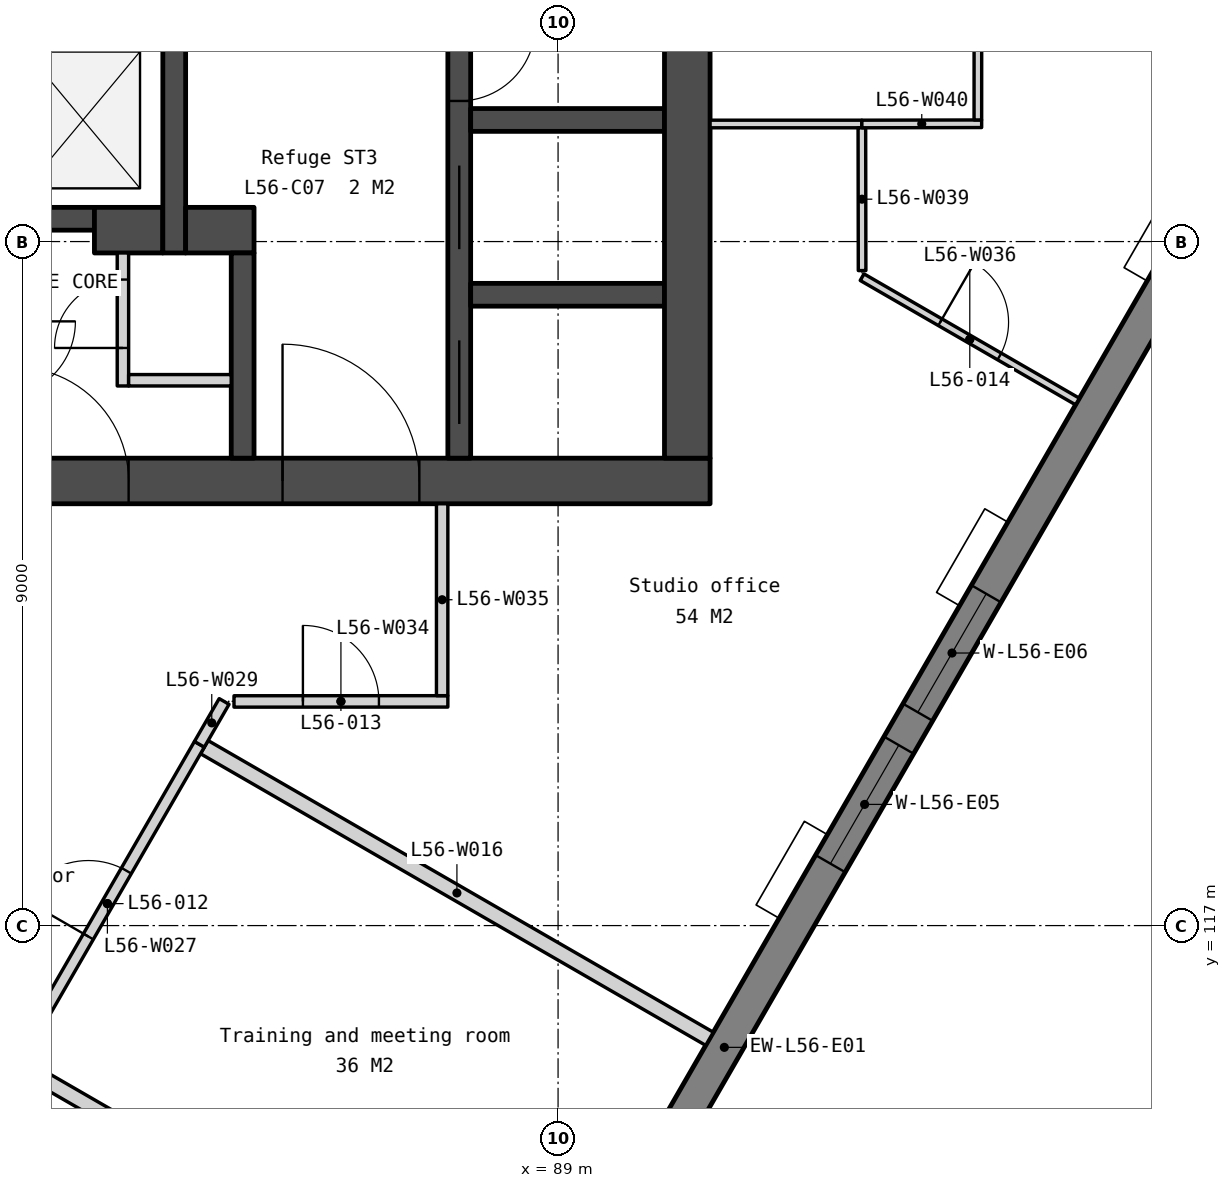
"""IFC4 building model, lengths in metres.
Left out: names, types, materials, properties, quantities, classifications, styles, units other than length and angle.
Written with IfcOpenShell. Run it as: python <this file> out.ifc"""

import sys

from ifc_helpers import new_model, si_unit, direction, frame, frame_2d, origin, place, context, subcontext, project, spatial, polyline, rectangle, outline, extrude, element, fill, save


model = new_model("IFC4")
c1 = context("Model", 3, precision=1e-05, world=origin(), true_north=direction((0.0, 1.0)))
c2 = subcontext(c1, "Body", "Model", "MODEL_VIEW")
j1 = project(units=[si_unit("LENGTHUNIT", "METRE"), si_unit("PLANEANGLEUNIT", "RADIAN")], contexts=[c1])
p1 = place(None, origin())
s1 = spatial("IfcSite", under=j1, at=p1, CompositionType="ELEMENT")
p2 = place(p1, origin())
s2 = spatial("IfcBuilding", under=s1, at=p2, CompositionType="ELEMENT")
p3 = place(p2, frame((0.0, 0.0, 223.1)))
s3 = spatial("IfcBuildingStorey", under=s2, at=p3, CompositionType="ELEMENT", Elevation=223.1)
p4 = place(p3, frame((69.0, 122.85, 0.0), z_axis=(0.0, 0.0, 1.0), x_axis=(1.0, 0.0, 0.0)))
e1 = element("IfcWall", 1, at=p4, inside=s3, PredefinedType="SOLIDWALL", context=c2, shape_type="SweptSolid", body=[
    extrude(rectangle(XDim=22.0, YDim=0.6, at=frame_2d((11.0, 0.0))), origin(), (0.0, 0.0, 1.0), 3.6),
])
p5 = place(p4, frame((16.375, 0.0, 0.0)))
e2 = element("IfcOpeningElement", 2, at=p5, cuts=e1, PredefinedType="OPENING", context=c2, shape_type="SweptSolid", body=[
    extrude(rectangle(XDim=1.8, YDim=2.1, at=frame_2d((0.9, 1.05))), frame((0.0, 0.31, 0.0), z_axis=(0.0, -1.0, 0.0), x_axis=(1.0, 0.0, 0.0)), (0.0, 0.0, 1.0), 0.62),
])
p6 = place(p4, frame((3.825, 0.0, 0.0)))
e3 = element("IfcOpeningElement", 3, at=p6, cuts=e1, PredefinedType="OPENING", context=c2, shape_type="SweptSolid", body=[
    extrude(rectangle(XDim=1.8, YDim=2.1, at=frame_2d((0.9, 1.05))), frame((0.0, 0.31, 0.0), z_axis=(0.0, -1.0, 0.0), x_axis=(1.0, 0.0, 0.0)), (0.0, 0.0, 1.0), 0.62),
])
p7 = place(p4, frame((12.85, 0.0, 0.0)))
e4 = element("IfcOpeningElement", 4, at=p7, cuts=e1, PredefinedType="OPENING", context=c2, shape_type="SweptSolid", body=[
    extrude(rectangle(XDim=1.5, YDim=2.1, at=frame_2d((0.75, 1.05))), frame((0.0, 0.31, 0.0), z_axis=(0.0, -1.0, 0.0), x_axis=(1.0, 0.0, 0.0)), (0.0, 0.0, 1.0), 0.62),
])
p8 = place(p3, frame((81.7, 126.3, 0.0), z_axis=(0.0, 0.0, 1.0), x_axis=(1.0, 0.0, 0.0)))
e5 = element("IfcWall", 5, at=p8, inside=s3, PredefinedType="SOLIDWALL", context=c2, shape_type="SweptSolid", body=[
    extrude(rectangle(XDim=1.2, YDim=0.3, at=frame_2d((0.6, 0.0))), origin(), (0.0, 0.0, 1.0), 3.6),
])
p9 = place(p3, frame((82.9, 126.15, 0.0), z_axis=(0.0, 0.0, 1.0), x_axis=(1.0, 0.0, 0.0)))
e6 = element("IfcWall", 6, at=p9, inside=s3, PredefinedType="SOLIDWALL", context=c2, shape_type="SweptSolid", body=[
    extrude(rectangle(XDim=0.9, YDim=0.6, at=frame_2d((0.45, 0.0))), origin(), (0.0, 0.0, 1.0), 3.6),
])
p10 = place(p3, frame((83.275, 125.85, 0.0), z_axis=(0.0, 0.0, 1.0), x_axis=(0.0, -1.0, 0.0)))
e7 = element("IfcWall", 7, at=p10, inside=s3, PredefinedType="PARTITIONING", context=c2, shape_type="SweptSolid", body=[
    extrude(rectangle(XDim=1.75, YDim=0.15, at=frame_2d((0.875, 0.0))), origin(), (0.0, 0.0, 1.0), 3.6),
])
p11 = place(p10, frame((0.35, 0.0, 0.0)))
e8 = element("IfcOpeningElement", 8, at=p11, cuts=e7, PredefinedType="OPENING", context=c2, shape_type="SweptSolid", body=[
    extrude(rectangle(XDim=0.9, YDim=2.1, at=frame_2d((0.45, 1.05))), frame((0.0, 0.085, 0.0), z_axis=(0.0, -1.0, 0.0), x_axis=(1.0, 0.0, 0.0)), (0.0, 0.0, 1.0), 0.17),
])
p12 = place(p3, frame((83.35, 124.175, 0.0), z_axis=(0.0, 0.0, 1.0), x_axis=(1.0, 0.0, 0.0)))
e9 = element("IfcWall", 9, at=p12, inside=s3, PredefinedType="PARTITIONING", context=c2, shape_type="SweptSolid", body=[
    extrude(rectangle(XDim=1.35, YDim=0.15, at=frame_2d((0.675, 0.0))), origin(), (0.0, 0.0, 1.0), 3.6),
])
p13 = place(p3, frame((83.95, 133.95, 0.0), z_axis=(0.0, 0.0, 1.0), x_axis=(0.0, -1.0, 0.0)))
e10 = element("IfcWall", 10, at=p13, inside=s3, PredefinedType="SOLIDWALL", context=c2, shape_type="SweptSolid", body=[
    extrude(rectangle(XDim=8.1, YDim=0.3, at=frame_2d((4.05, 0.0))), origin(), (0.0, 0.0, 1.0), 3.6),
])
p14 = place(p3, frame((84.1, 126.15, 0.0), z_axis=(0.0, 0.0, 1.0), x_axis=(1.0, 0.0, 0.0)))
e11 = element("IfcWall", 11, at=p14, inside=s3, PredefinedType="SOLIDWALL", context=c2, shape_type="SweptSolid", body=[
    extrude(rectangle(XDim=0.9, YDim=0.6, at=frame_2d((0.45, 0.0))), origin(), (0.0, 0.0, 1.0), 3.6),
])
p15 = place(p3, frame((84.85, 125.85, 0.0), z_axis=(0.0, 0.0, 1.0), x_axis=(0.0, -1.0, 0.0)))
e12 = element("IfcWall", 12, at=p15, inside=s3, PredefinedType="SOLIDWALL", context=c2, shape_type="SweptSolid", body=[
    extrude(rectangle(XDim=2.7, YDim=0.3, at=frame_2d((1.35, 0.0))), origin(), (0.0, 0.0, 1.0), 3.6),
])
p16 = place(p3, frame((87.7, 133.95, 0.0), z_axis=(0.0, 0.0, 1.0), x_axis=(0.0, -1.0, 0.0)))
e13 = element("IfcWall", 13, at=p16, inside=s3, PredefinedType="SOLIDWALL", context=c2, shape_type="SweptSolid", body=[
    extrude(rectangle(XDim=10.8, YDim=0.3, at=frame_2d((5.4, 0.0))), origin(), (0.0, 0.0, 1.0), 3.6),
])
p17 = place(p16, frame((6.95, 0.0, 0.0)))
e14 = element("IfcOpeningElement", 14, at=p17, cuts=e13, PredefinedType="OPENING", context=c2, shape_type="SweptSolid", body=[
    extrude(rectangle(XDim=1.1, YDim=2.1, at=frame_2d((0.55, 1.05))), frame((0.0, 0.16, 0.0), z_axis=(0.0, -1.0, 0.0), x_axis=(1.0, 0.0, 0.0)), (0.0, 0.0, 1.0), 0.32),
])
p18 = place(p16, frame((5.1, 0.0, 0.0)))
e15 = element("IfcOpeningElement", 15, at=p18, cuts=e13, PredefinedType="OPENING", context=c2, shape_type="SweptSolid", body=[
    extrude(rectangle(XDim=1.0, YDim=2.1, at=frame_2d((0.5, 1.05))), frame((0.0, 0.16, 0.0), z_axis=(0.0, -1.0, 0.0), x_axis=(1.0, 0.0, 0.0)), (0.0, 0.0, 1.0), 0.32),
])
p19 = place(p16, frame((9.25, 0.0, 0.0)))
e16 = element("IfcOpeningElement", 16, at=p19, cuts=e13, PredefinedType="OPENING", context=c2, shape_type="SweptSolid", body=[
    extrude(rectangle(XDim=1.1, YDim=2.1, at=frame_2d((0.55, 1.05))), frame((0.0, 0.16, 0.0), z_axis=(0.0, -1.0, 0.0), x_axis=(1.0, 0.0, 0.0)), (0.0, 0.0, 1.0), 0.32),
])
for number, where, z_axis, x_axis in (
    (17, (87.85, 127.6, 0.0), (0.0, 0.0, 1.0), (1.0, 0.0, 0.0)),
    (18, (87.85, 125.3, 0.0), (0.0, 0.0, 1.0), (1.0, 0.0, 0.0)),
):
    element("IfcWall", number, at=place(p3, frame(where, z_axis=z_axis, x_axis=x_axis)), inside=s3, PredefinedType="SOLIDWALL", context=c2, shape_type="SweptSolid", body=[
        extrude(rectangle(XDim=2.55, YDim=0.3, at=frame_2d((1.275, 0.0))), origin(), (0.0, 0.0, 1.0), 3.6),
    ])
p20 = place(p3, frame((90.7, 133.95, 0.0), z_axis=(0.0, 0.0, 1.0), x_axis=(0.0, -1.0, 0.0)))
e19 = element("IfcWall", 19, at=p20, inside=s3, PredefinedType="SOLIDWALL", context=c2, shape_type="SweptSolid", body=[
    extrude(rectangle(XDim=10.8, YDim=0.6, at=frame_2d((5.4, 0.0))), origin(), (0.0, 0.0, 1.0), 3.6),
])
p21 = place(p3, frame((81.505, 98.627, -0.15), z_axis=(0.0, 0.0, 1.0), x_axis=(0.500002199942, 0.866024133644, 0.0)))
e20 = element("IfcWall", 20, at=p21, inside=s3, PredefinedType="SOLIDWALL", context=c2, shape_type="SweptSolid", body=[
    extrude(outline(polyline([(38.729, 0.0), (38.729, 3.75), (0.0, 3.75), (0.0, 0.0), (38.729, 0.0)])), frame((0.0, 0.225, 0.0), z_axis=(0.0, -1.0, 0.0), x_axis=(1.0, 0.0, 0.0)), (0.0, 0.0, 1.0), 0.45),
])
p22 = place(p21, frame((2.791, 0.0, 0.95)))
e21 = element("IfcOpeningElement", 21, at=p22, cuts=e20, PredefinedType="OPENING", context=c2, shape_type="SweptSolid", body=[
    extrude(rectangle(XDim=1.8, YDim=2.2, at=frame_2d((0.9, 1.1))), frame((0.0, 0.235, 0.0), z_axis=(0.0, -1.0, 0.0), x_axis=(1.0, 0.0, 0.0)), (0.0, 0.0, 1.0), 0.47),
])
p23 = place(p21, frame((5.091, 0.0, 0.95)))
e22 = element("IfcOpeningElement", 22, at=p23, cuts=e20, PredefinedType="OPENING", context=c2, shape_type="SweptSolid", body=[
    extrude(rectangle(XDim=1.8, YDim=2.2, at=frame_2d((0.9, 1.1))), frame((0.0, 0.235, 0.0), z_axis=(0.0, -1.0, 0.0), x_axis=(1.0, 0.0, 0.0)), (0.0, 0.0, 1.0), 0.47),
])
p24 = place(p21, frame((12.473, 0.0, 0.95)))
e23 = element("IfcOpeningElement", 23, at=p24, cuts=e20, PredefinedType="OPENING", context=c2, shape_type="SweptSolid", body=[
    extrude(rectangle(XDim=1.8, YDim=2.2, at=frame_2d((0.9, 1.1))), frame((0.0, 0.235, 0.0), z_axis=(0.0, -1.0, 0.0), x_axis=(1.0, 0.0, 0.0)), (0.0, 0.0, 1.0), 0.47),
])
p25 = place(p21, frame((14.773, 0.0, 0.95)))
e24 = element("IfcOpeningElement", 24, at=p25, cuts=e20, PredefinedType="OPENING", context=c2, shape_type="SweptSolid", body=[
    extrude(rectangle(XDim=1.8, YDim=2.2, at=frame_2d((0.9, 1.1))), frame((0.0, 0.235, 0.0), z_axis=(0.0, -1.0, 0.0), x_axis=(1.0, 0.0, 0.0)), (0.0, 0.0, 1.0), 0.47),
])
p26 = place(p21, frame((22.156, 0.0, 0.95)))
e25 = element("IfcOpeningElement", 25, at=p26, cuts=e20, PredefinedType="OPENING", context=c2, shape_type="SweptSolid", body=[
    extrude(rectangle(XDim=1.8, YDim=2.2, at=frame_2d((0.9, 1.1))), frame((0.0, 0.235, 0.0), z_axis=(0.0, -1.0, 0.0), x_axis=(1.0, 0.0, 0.0)), (0.0, 0.0, 1.0), 0.47),
])
p27 = place(p21, frame((24.456, 0.0, 0.95)))
e26 = element("IfcOpeningElement", 26, at=p27, cuts=e20, PredefinedType="OPENING", context=c2, shape_type="SweptSolid", body=[
    extrude(rectangle(XDim=1.8, YDim=2.2, at=frame_2d((0.9, 1.1))), frame((0.0, 0.235, 0.0), z_axis=(0.0, -1.0, 0.0), x_axis=(1.0, 0.0, 0.0)), (0.0, 0.0, 1.0), 0.47),
])
p28 = place(p21, frame((31.838, 0.0, 0.95)))
e27 = element("IfcOpeningElement", 27, at=p28, cuts=e20, PredefinedType="OPENING", context=c2, shape_type="SweptSolid", body=[
    extrude(rectangle(XDim=1.8, YDim=2.2, at=frame_2d((0.9, 1.1))), frame((0.0, 0.235, 0.0), z_axis=(0.0, -1.0, 0.0), x_axis=(1.0, 0.0, 0.0)), (0.0, 0.0, 1.0), 0.47),
])
p29 = place(p21, frame((34.138, 0.0, 0.95)))
e28 = element("IfcOpeningElement", 28, at=p29, cuts=e20, PredefinedType="OPENING", context=c2, shape_type="SweptSolid", body=[
    extrude(rectangle(XDim=1.8, YDim=2.2, at=frame_2d((0.9, 1.1))), frame((0.0, 0.235, 0.0), z_axis=(0.0, -1.0, 0.0), x_axis=(1.0, 0.0, 0.0)), (0.0, 0.0, 1.0), 0.47),
])
p30 = place(p3, frame((81.934, 115.15, 0.0), z_axis=(0.0, 0.0, 1.0), x_axis=(0.866027525232, -0.499996325527, 0.0)))
e29 = element("IfcWall", 29, at=p30, inside=s3, PredefinedType="PARTITIONING", context=c2, shape_type="SweptSolid", body=[
    extrude(rectangle(XDim=7.665, YDim=0.2, at=frame_2d((3.833, 0.0))), origin(), (0.0, 0.0, 1.0), 3.6),
])
p31 = place(p3, frame((84.346, 119.348, 0.0), z_axis=(0.0, 0.0, 1.0), x_axis=(0.866030377306, -0.499991385509, 0.0)))
e30 = element("IfcWall", 30, at=p31, inside=s3, PredefinedType="PARTITIONING", context=c2, shape_type="SweptSolid", body=[
    extrude(rectangle(XDim=7.675, YDim=0.2, at=frame_2d((3.837, 0.0))), origin(), (0.0, 0.0, 1.0), 3.6),
])
p32 = place(p3, frame((81.86, 115.193, 0.0), z_axis=(0.0, 0.0, 1.0), x_axis=(0.500006196252, 0.866021826347, 0.0)))
e31 = element("IfcWall", 31, at=p32, inside=s3, PredefinedType="PARTITIONING", context=c2, shape_type="SweptSolid", body=[
    extrude(rectangle(XDim=4.841, YDim=0.15, at=frame_2d((2.421, 0.0))), origin(), (0.0, 0.0, 1.0), 3.6),
])
p33 = place(p32, frame((1.921, 0.0, 0.0)))
e32 = element("IfcOpeningElement", 32, at=p33, cuts=e31, PredefinedType="OPENING", context=c2, shape_type="SweptSolid", body=[
    extrude(rectangle(XDim=1.0, YDim=2.1, at=frame_2d((0.5, 1.05))), frame((0.0, 0.085, 0.0), z_axis=(0.0, -1.0, 0.0), x_axis=(1.0, 0.0, 0.0)), (0.0, 0.0, 1.0), 0.17),
])
p34 = place(p3, frame((84.281, 119.385, 0.0), z_axis=(0.0, 0.0, 1.0), x_axis=(0.499971370958, 0.866041932139, 0.0)))
e33 = element("IfcWall", 33, at=p34, inside=s3, PredefinedType="PARTITIONING", context=c2, shape_type="SweptSolid", body=[
    extrude(rectangle(XDim=0.651, YDim=0.15, at=frame_2d((0.325, 0.0))), origin(), (0.0, 0.0, 1.0), 3.6),
])
p35 = place(p3, frame((84.736, 119.949, 0.0), z_axis=(0.0, 0.0, 1.0), x_axis=(0.999999939771, 0.000347071563, 0.0)))
e34 = element("IfcWall", 34, at=p35, inside=s3, PredefinedType="PARTITIONING", context=c2, shape_type="SweptSolid", body=[
    extrude(rectangle(XDim=2.814, YDim=0.15, at=frame_2d((1.407, 0.0))), origin(), (0.0, 0.0, 1.0), 3.6),
])
p36 = place(p35, frame((0.907, 0.0, 0.0)))
e35 = element("IfcOpeningElement", 35, at=p36, cuts=e34, PredefinedType="OPENING", context=c2, shape_type="SweptSolid", body=[
    extrude(rectangle(XDim=1.0, YDim=2.1, at=frame_2d((0.5, 1.05))), frame((0.0, 0.085, 0.0), z_axis=(0.0, -1.0, 0.0), x_axis=(1.0, 0.0, 0.0)), (0.0, 0.0, 1.0), 0.17),
])
p37 = place(p3, frame((87.475, 120.025, 0.0), z_axis=(0.0, 0.0, 1.0), x_axis=(9.6683747e-05, 0.999999995326, 0.0)))
e36 = element("IfcWall", 36, at=p37, inside=s3, PredefinedType="PARTITIONING", context=c2, shape_type="SweptSolid", body=[
    extrude(rectangle(XDim=2.525, YDim=0.15, at=frame_2d((1.263, 0.0))), origin(), (0.0, 0.0, 1.0), 3.6),
])
p38 = place(p3, frame((93.0, 125.531, 0.0), z_axis=(0.0, 0.0, 1.0), x_axis=(0.866035243948, -0.499982955949, 0.0)))
e37 = element("IfcWall", 37, at=p38, inside=s3, PredefinedType="PARTITIONING", context=c2, shape_type="SweptSolid", body=[
    extrude(rectangle(XDim=3.272, YDim=0.1, at=frame_2d((1.636, 0.0))), origin(), (0.0, 0.0, 1.0), 3.6),
])
p39 = place(p38, frame((1.186, 0.0, 0.0)))
e38 = element("IfcOpeningElement", 38, at=p39, cuts=e37, PredefinedType="OPENING", context=c2, shape_type="SweptSolid", body=[
    extrude(rectangle(XDim=0.9, YDim=2.1, at=frame_2d((0.45, 1.05))), frame((0.0, 0.06, 0.0), z_axis=(0.0, -1.0, 0.0), x_axis=(1.0, 0.0, 0.0)), (0.0, 0.0, 1.0), 0.12),
])
p40 = place(p3, frame((91.0, 127.547, 0.0), z_axis=(0.0, 0.0, 1.0), x_axis=(1.0, 0.0, 0.0)))
e39 = element("IfcWall", 39, at=p40, inside=s3, PredefinedType="PARTITIONING", context=c2, shape_type="SweptSolid", body=[
    extrude(rectangle(XDim=1.997, YDim=0.1, at=frame_2d((0.999, 0.0))), origin(), (0.0, 0.0, 1.0), 3.6),
])
p41 = place(p3, frame((93.0, 125.618, 0.0), z_axis=(0.0, 0.0, 1.0), x_axis=(-0.001559249664, 0.99999878437, 0.0)))
e40 = element("IfcWall", 40, at=p41, inside=s3, PredefinedType="PARTITIONING", context=c2, shape_type="SweptSolid", body=[
    extrude(rectangle(XDim=1.879, YDim=0.1, at=frame_2d((0.939, 0.0))), origin(), (0.0, 0.0, 1.0), 3.6),
])
p42 = place(p3, frame((92.997, 127.547, 0.0), z_axis=(0.0, 0.0, 1.0), x_axis=(0.999998272019, 0.0018590208, 0.0)))
e41 = element("IfcWall", 41, at=p42, inside=s3, PredefinedType="PARTITIONING", context=c2, shape_type="SweptSolid", body=[
    extrude(rectangle(XDim=1.576, YDim=0.1, at=frame_2d((0.788, 0.0))), origin(), (0.0, 0.0, 1.0), 3.6),
])
p43 = place(p3, frame((94.523, 127.6, 0.0), z_axis=(0.0, 0.0, 1.0), x_axis=(0.00049179746, 0.999999879068, 0.0)))
e42 = element("IfcWall", 42, at=p43, inside=s3, PredefinedType="PARTITIONING", context=c2, shape_type="SweptSolid", body=[
    extrude(rectangle(XDim=6.95, YDim=0.1, at=frame_2d((3.475, 0.0))), origin(), (0.0, 0.0, 1.0), 3.6),
])
p44 = place(p43, frame((2.975, 0.0, 0.0)))
e43 = element("IfcOpeningElement", 43, at=p44, cuts=e42, PredefinedType="OPENING", context=c2, shape_type="SweptSolid", body=[
    extrude(rectangle(XDim=1.0, YDim=2.1, at=frame_2d((0.5, 1.05))), frame((0.0, 0.06, 0.0), z_axis=(0.0, -1.0, 0.0), x_axis=(1.0, 0.0, 0.0)), (0.0, 0.0, 1.0), 0.12),
])
p45 = place(p17, origin())
e44 = element("IfcDoor", 44, at=p45, inside=s3, OperationType="SLIDING_TO_LEFT", PredefinedType="DOOR", context=c2, shape_type="SweptSolid", body=[
    extrude(rectangle(XDim=1.1, YDim=2.1, at=frame_2d((0.55, 1.05))), frame((0.0, 0.025, 0.0), z_axis=(0.0, -1.0, 0.0), x_axis=(1.0, 0.0, 0.0)), (0.0, 0.0, 1.0), 0.05),
])
fill(e14, e44)
p46 = place(p5, origin())
e45 = element("IfcDoor", 45, at=p46, inside=s3, OperationType="DOUBLE_DOOR_DOUBLE_SWING", PredefinedType="DOOR", context=c2, shape_type="SweptSolid", body=[
    extrude(rectangle(XDim=1.8, YDim=2.1, at=frame_2d((0.9, 1.05))), frame((0.0, 0.025, 0.0), z_axis=(0.0, -1.0, 0.0), x_axis=(1.0, 0.0, 0.0)), (0.0, 0.0, 1.0), 0.05),
])
fill(e2, e45)
p47 = place(p7, origin())
e46 = element("IfcDoor", 46, at=p47, inside=s3, OperationType="DOUBLE_DOOR_DOUBLE_SWING", PredefinedType="DOOR", context=c2, shape_type="SweptSolid", body=[
    extrude(rectangle(XDim=1.5, YDim=2.1, at=frame_2d((0.75, 1.05))), frame((0.0, 0.025, 0.0), z_axis=(0.0, -1.0, 0.0), x_axis=(1.0, 0.0, 0.0)), (0.0, 0.0, 1.0), 0.05),
])
fill(e4, e46)
p48 = place(p11, origin())
e47 = element("IfcDoor", 47, at=p48, inside=s3, OperationType="SINGLE_SWING_RIGHT", PredefinedType="DOOR", context=c2, shape_type="SweptSolid", body=[
    extrude(rectangle(XDim=0.9, YDim=2.1, at=frame_2d((0.45, 1.05))), frame((0.0, 0.025, 0.0), z_axis=(0.0, -1.0, 0.0), x_axis=(1.0, 0.0, 0.0)), (0.0, 0.0, 1.0), 0.05),
])
fill(e8, e47)
p49 = place(p18, origin())
e48 = element("IfcDoor", 48, at=p49, inside=s3, OperationType="SINGLE_SWING_LEFT", PredefinedType="DOOR", context=c2, shape_type="SweptSolid", body=[
    extrude(rectangle(XDim=1.0, YDim=2.1, at=frame_2d((0.5, 1.05))), frame((0.0, 0.025, 0.0), z_axis=(0.0, -1.0, 0.0), x_axis=(1.0, 0.0, 0.0)), (0.0, 0.0, 1.0), 0.05),
])
fill(e15, e48)
p50 = place(p19, origin())
e49 = element("IfcDoor", 49, at=p50, inside=s3, OperationType="SLIDING_TO_LEFT", PredefinedType="DOOR", context=c2, shape_type="SweptSolid", body=[
    extrude(rectangle(XDim=1.1, YDim=2.1, at=frame_2d((0.55, 1.05))), frame((0.0, 0.025, 0.0), z_axis=(0.0, -1.0, 0.0), x_axis=(1.0, 0.0, 0.0)), (0.0, 0.0, 1.0), 0.05),
])
fill(e16, e49)
p51 = place(p26, origin())
e50 = element("IfcWindow", 50, at=p51, inside=s3, PartitioningType="SINGLE_PANEL", PredefinedType="WINDOW", context=c2, shape_type="SweptSolid", body=[
    extrude(rectangle(XDim=1.8, YDim=2.2, at=frame_2d((0.9, 1.1))), frame((0.0, 0.03, 0.0), z_axis=(0.0, -1.0, 0.0), x_axis=(1.0, 0.0, 0.0)), (0.0, 0.0, 1.0), 0.06),
])
fill(e25, e50)
p52 = place(p27, origin())
e51 = element("IfcWindow", 51, at=p52, inside=s3, PartitioningType="SINGLE_PANEL", PredefinedType="WINDOW", context=c2, shape_type="SweptSolid", body=[
    extrude(rectangle(XDim=1.8, YDim=2.2, at=frame_2d((0.9, 1.1))), frame((0.0, 0.03, 0.0), z_axis=(0.0, -1.0, 0.0), x_axis=(1.0, 0.0, 0.0)), (0.0, 0.0, 1.0), 0.06),
])
fill(e26, e51)
p53 = place(p33, origin())
e52 = element("IfcDoor", 52, at=p53, inside=s3, OperationType="SINGLE_SWING_LEFT", PredefinedType="DOOR", context=c2, shape_type="SweptSolid", body=[
    extrude(rectangle(XDim=1.0, YDim=2.1, at=frame_2d((0.5, 1.05))), frame((0.0, 0.025, 0.0), z_axis=(0.0, -1.0, 0.0), x_axis=(1.0, 0.0, 0.0)), (0.0, 0.0, 1.0), 0.05),
])
fill(e32, e52)
p54 = place(p36, origin())
e53 = element("IfcDoor", 53, at=p54, inside=s3, OperationType="SINGLE_SWING_LEFT", PredefinedType="DOOR", context=c2, shape_type="SweptSolid", body=[
    extrude(rectangle(XDim=1.0, YDim=2.1, at=frame_2d((0.5, 1.05))), frame((0.0, 0.025, 0.0), z_axis=(0.0, -1.0, 0.0), x_axis=(1.0, 0.0, 0.0)), (0.0, 0.0, 1.0), 0.05),
])
fill(e35, e53)
p55 = place(p39, origin())
e54 = element("IfcDoor", 54, at=p55, inside=s3, OperationType="SINGLE_SWING_LEFT", PredefinedType="DOOR", context=c2, shape_type="SweptSolid", body=[
    extrude(rectangle(XDim=0.9, YDim=2.1, at=frame_2d((0.45, 1.05))), frame((0.0, 0.025, 0.0), z_axis=(0.0, -1.0, 0.0), x_axis=(1.0, 0.0, 0.0)), (0.0, 0.0, 1.0), 0.05),
])
fill(e38, e54)
save(model, sys.argv[1])
